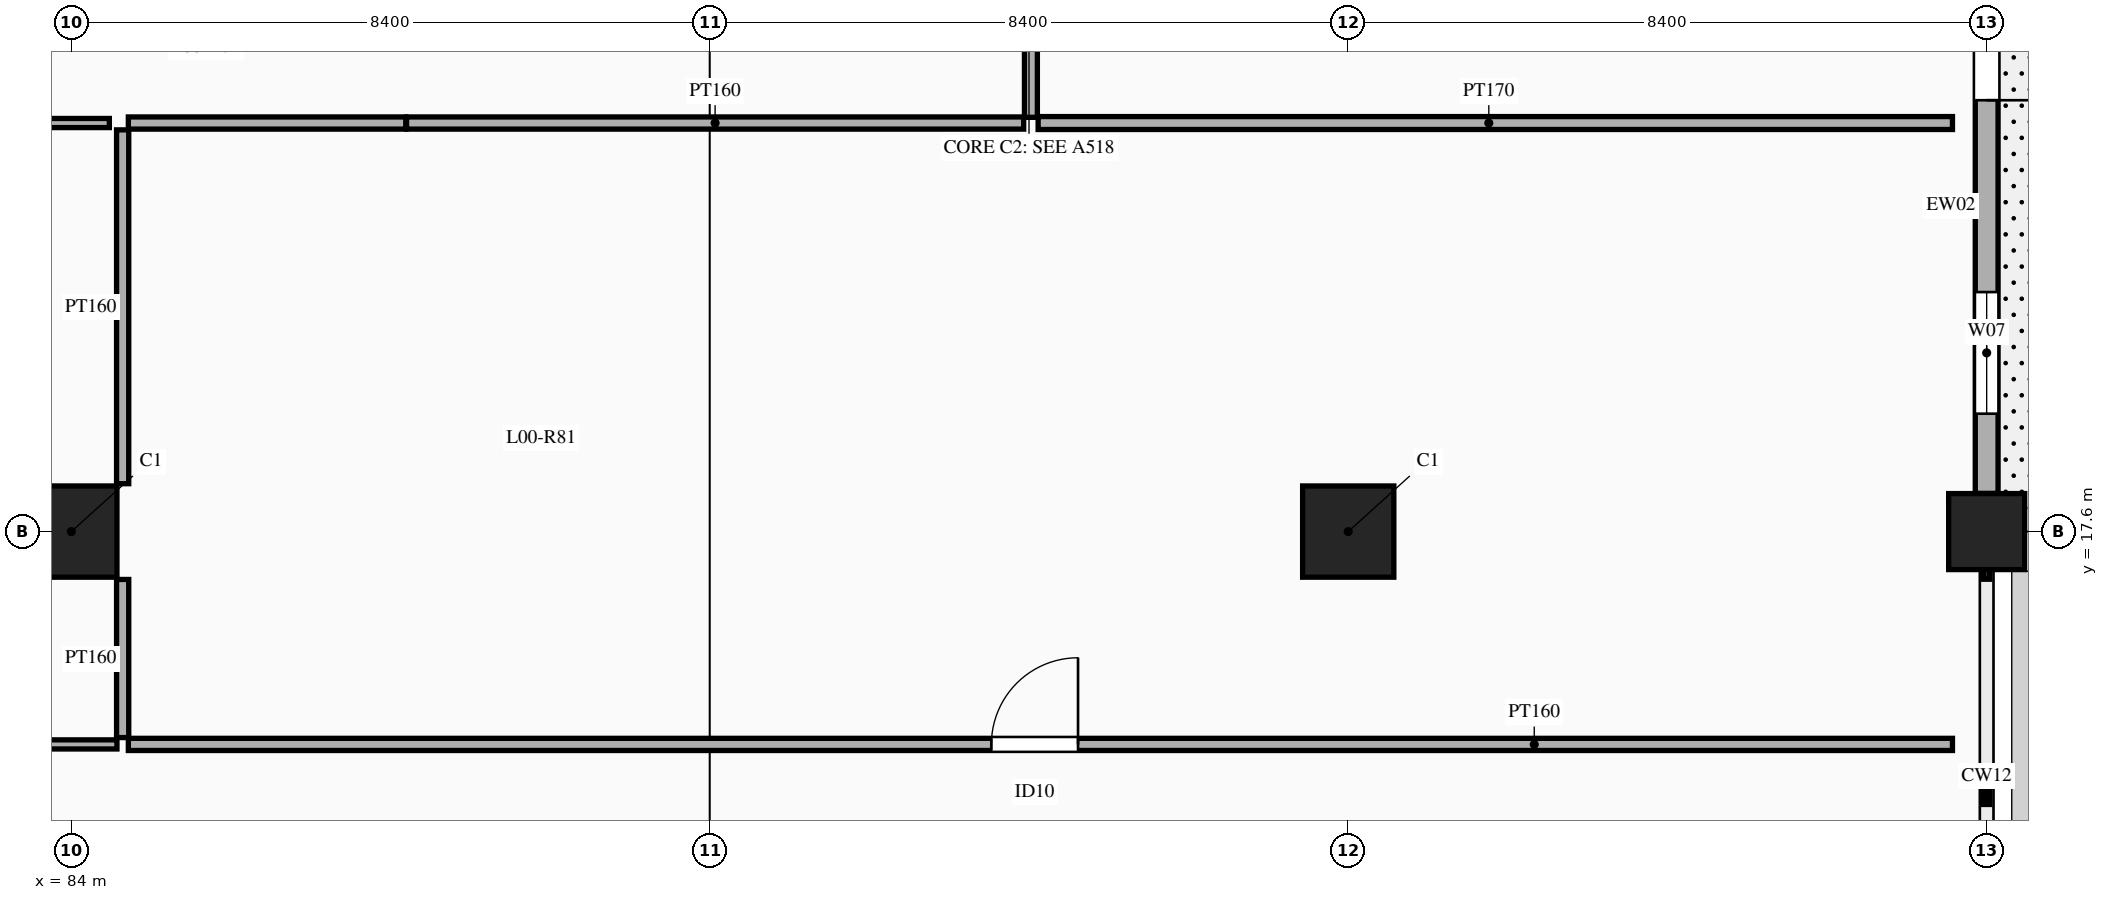
"""IFC4 building model, lengths in metres.
Left out: names, types, materials, properties, quantities, classifications, styles, units other than length and angle.
Written with IfcOpenShell. Run it as: python <this file> out.ifc"""

import sys

from ifc_helpers import new_model, si_unit, direction, frame, frame_2d, origin, origin_2d, place, context, subcontext, project, spatial, rectangle, extrude, element, fill, save


model = new_model("IFC4")
c1 = context("Model", 3, precision=1e-05, world=origin(), true_north=direction((0.0, 1.0)))
c2 = subcontext(c1, "Body", "Model", "MODEL_VIEW")
j1 = project(units=[si_unit("LENGTHUNIT", "METRE"), si_unit("PLANEANGLEUNIT", "RADIAN")], contexts=[c1])
p1 = place(None, origin())
s1 = spatial("IfcSite", under=j1, at=p1, CompositionType="ELEMENT")
p2 = place(p1, origin())
s2 = spatial("IfcBuilding", under=s1, at=p2, CompositionType="ELEMENT")
p3 = place(p2, origin())
s3 = spatial("IfcBuildingStorey", under=s2, at=p3, CompositionType="ELEMENT", Elevation=0.0)
for number, where, z_axis, x_axis in (
    (1, (84.0, 17.6, 0.0), (0.0, 0.0, 1.0), (1.0, 0.0, 0.0)),
    (2, (100.8, 17.6, 0.0), (0.0, 0.0, 1.0), (1.0, 0.0, 0.0)),
):
    element("IfcColumn", number, at=place(p3, frame(where, z_axis=z_axis, x_axis=x_axis)), inside=s3, PredefinedType="COLUMN", context=c2, shape_type="SweptSolid", body=[
        extrude(rectangle(XDim=1.2, YDim=1.2, at=origin_2d()), origin(), (0.0, 0.0, 1.0), 5.4),
    ])
p4 = place(p3, frame((109.2, 17.6, 0.0), z_axis=(0.0, 0.0, 1.0), x_axis=(1.0, 0.0, 0.0)))
e3 = element("IfcColumn", 3, at=p4, inside=s3, PredefinedType="COLUMN", context=c2, shape_type="SweptSolid", body=[
    extrude(rectangle(XDim=1.0, YDim=1.0, at=origin_2d()), origin(), (0.0, 0.0, 1.0), 5.4),
])
p5 = place(p3, frame((109.2, 18.102, 0.0), z_axis=(0.0, 0.0, 1.0), x_axis=(0.0, 1.0, 0.0)))
e4 = element("IfcWall", 4, at=p5, inside=s3, PredefinedType="SOLIDWALL", context=c2, shape_type="SweptSolid", body=[
    extrude(rectangle(XDim=7.396, YDim=0.3, at=frame_2d((3.698, 0.0))), origin(), (0.0, 0.0, 1.0), 4.45),
])
p6 = place(p5, frame((5.173, 0.0, 0.0)))
e5 = element("IfcOpeningElement", 5, at=p6, cuts=e4, PredefinedType="OPENING", context=c2, shape_type="SweptSolid", body=[
    extrude(rectangle(XDim=1.75, YDim=2.35, at=frame_2d((0.875, 1.175))), frame((0.0, 0.16, 0.0), z_axis=(0.0, -1.0, 0.0), x_axis=(1.0, 0.0, 0.0)), (0.0, 0.0, 1.0), 0.32),
])
p7 = place(p5, frame((1.049, 0.0, 0.9)))
e6 = element("IfcOpeningElement", 6, at=p7, cuts=e4, PredefinedType="OPENING", context=c2, shape_type="SweptSolid", body=[
    extrude(rectangle(XDim=1.6, YDim=2.1, at=frame_2d((0.8, 1.05))), frame((0.0, 0.16, 0.0), z_axis=(0.0, -1.0, 0.0), x_axis=(1.0, 0.0, 0.0)), (0.0, 0.0, 1.0), 0.32),
])
p8 = place(p3, frame((76.05, 22.975, 0.0), z_axis=(0.0, 0.0, 1.0), x_axis=(1.0, 0.0, 0.0)))
e7 = element("IfcWall", 7, at=p8, inside=s3, PredefinedType="PARTITIONING", context=c2, shape_type="SweptSolid", body=[
    extrude(rectangle(XDim=8.45, YDim=0.12, at=frame_2d((4.225, 0.0))), origin(), (0.0, 0.0, 1.0), 4.35),
])
p9 = place(p3, frame((84.75, 22.975, 0.0), z_axis=(0.0, 0.0, 1.0), x_axis=(1.0, 0.0, 0.0)))
e8 = element("IfcWall", 8, at=p9, inside=s3, PredefinedType="PARTITIONING", context=c2, shape_type="SweptSolid", body=[
    extrude(rectangle(XDim=3.65, YDim=0.16, at=frame_2d((1.825, 0.0))), origin(), (0.0, 0.0, 1.0), 4.35),
])
p10 = place(p3, frame((96.625, 23.05, 0.0), z_axis=(0.0, 0.0, 1.0), x_axis=(0.0, 1.0, 0.0)))
e9 = element("IfcWall", 9, at=p10, inside=s3, PredefinedType="PARTITIONING", context=c2, shape_type="SweptSolid", body=[
    extrude(rectangle(XDim=2.85, YDim=0.17, at=frame_2d((1.425, 0.0))), origin(), (0.0, 0.0, 1.0), 4.35),
])
p11 = place(p10, frame((0.885, 0.0, 0.0)))
e10 = element("IfcOpeningElement", 10, at=p11, cuts=e9, PredefinedType="OPENING", context=c2, shape_type="SweptSolid", body=[
    extrude(rectangle(XDim=1.08, YDim=2.15, at=frame_2d((0.54, 1.075))), frame((0.0, 0.095, 0.0), z_axis=(0.0, -1.0, 0.0), x_axis=(1.0, 0.0, 0.0)), (0.0, 0.0, 1.0), 0.19),
])
p12 = place(p3, frame((88.41, 22.975, 0.0), z_axis=(0.0, 0.0, 1.0), x_axis=(1.0, 0.0, 0.0)))
e11 = element("IfcWall", 11, at=p12, inside=s3, PredefinedType="PARTITIONING", context=c2, shape_type="SweptSolid", body=[
    extrude(rectangle(XDim=8.12, YDim=0.16, at=frame_2d((4.06, 0.0))), origin(), (0.0, 0.0, 1.0), 4.35),
])
p13 = place(p3, frame((96.72, 22.975, 0.0), z_axis=(0.0, 0.0, 1.0), x_axis=(1.0, 0.0, 0.0)))
e12 = element("IfcWall", 12, at=p13, inside=s3, PredefinedType="PARTITIONING", context=c2, shape_type="SweptSolid", body=[
    extrude(rectangle(XDim=12.03, YDim=0.17, at=frame_2d((6.015, 0.0))), origin(), (0.0, 0.0, 1.0), 4.35),
])
p14 = place(p3, frame((61.95, 14.8, 0.0), z_axis=(0.0, 0.0, 1.0), x_axis=(1.0, 0.0, 0.0)))
e13 = element("IfcWall", 13, at=p14, inside=s3, PredefinedType="PARTITIONING", context=c2, shape_type="SweptSolid", body=[
    extrude(rectangle(XDim=22.65, YDim=0.12, at=frame_2d((11.325, 0.0))), origin(), (0.0, 0.0, 1.0), 4.35),
])
p15 = place(p14, frame((9.378, 0.0, 0.0)))
e14 = element("IfcOpeningElement", 14, at=p15, cuts=e13, PredefinedType="OPENING", context=c2, shape_type="SweptSolid", body=[
    extrude(rectangle(XDim=1.5, YDim=2.3, at=frame_2d((0.75, 1.15))), frame((0.0, 0.07, 0.0), z_axis=(0.0, -1.0, 0.0), x_axis=(1.0, 0.0, 0.0)), (0.0, 0.0, 1.0), 0.14),
])
p16 = place(p3, frame((84.75, 14.8, 0.0), z_axis=(0.0, 0.0, 1.0), x_axis=(1.0, 0.0, 0.0)))
e15 = element("IfcWall", 15, at=p16, inside=s3, PredefinedType="PARTITIONING", context=c2, shape_type="SweptSolid", body=[
    extrude(rectangle(XDim=24.0, YDim=0.16, at=frame_2d((12.0, 0.0))), origin(), (0.0, 0.0, 1.0), 4.35),
])
p17 = place(p16, frame((11.355, 0.0, 0.0)))
e16 = element("IfcOpeningElement", 16, at=p17, cuts=e15, PredefinedType="OPENING", context=c2, shape_type="SweptSolid", body=[
    extrude(rectangle(XDim=1.14, YDim=2.22, at=frame_2d((0.57, 1.11))), frame((0.0, 0.09, 0.0), z_axis=(0.0, -1.0, 0.0), x_axis=(1.0, 0.0, 0.0)), (0.0, 0.0, 1.0), 0.18),
])
p18 = place(p3, frame((84.675, 14.89, 0.0), z_axis=(0.0, 0.0, 1.0), x_axis=(0.0, 1.0, 0.0)))
e17 = element("IfcWall", 17, at=p18, inside=s3, PredefinedType="PARTITIONING", context=c2, shape_type="SweptSolid", body=[
    extrude(rectangle(XDim=2.08, YDim=0.16, at=frame_2d((1.04, 0.0))), origin(), (0.0, 0.0, 1.0), 4.35),
])
p19 = place(p3, frame((84.675, 18.23, 0.0), z_axis=(0.0, 0.0, 1.0), x_axis=(0.0, 1.0, 0.0)))
e18 = element("IfcWall", 18, at=p19, inside=s3, PredefinedType="PARTITIONING", context=c2, shape_type="SweptSolid", body=[
    extrude(rectangle(XDim=4.655, YDim=0.16, at=frame_2d((2.328, 0.0))), origin(), (0.0, 0.0, 1.0), 4.35),
])
p20 = place(p6, frame((1.75, 0.0, 0.0), z_axis=(0.0, 0.0, 1.0), x_axis=(-1.0, 0.0, 0.0)))
e19 = element("IfcDoor", 19, at=p20, inside=s3, OperationType="DOUBLE_DOOR_SINGLE_SWING", PredefinedType="DOOR", context=c2, shape_type="SweptSolid", body=[
    extrude(rectangle(XDim=1.75, YDim=2.35, at=frame_2d((0.875, 1.175))), frame((0.0, 0.025, 0.0), z_axis=(0.0, -1.0, 0.0), x_axis=(1.0, 0.0, 0.0)), (0.0, 0.0, 1.0), 0.05),
])
fill(e5, e19)
p21 = place(p7, origin())
e20 = element("IfcWindow", 20, at=p21, inside=s3, PartitioningType="DOUBLE_PANEL_VERTICAL", PredefinedType="WINDOW", context=c2, shape_type="SweptSolid", body=[
    extrude(rectangle(XDim=1.6, YDim=2.1, at=frame_2d((0.8, 1.05))), frame((0.0, 0.03, 0.0), z_axis=(0.0, -1.0, 0.0), x_axis=(1.0, 0.0, 0.0)), (0.0, 0.0, 1.0), 0.06),
])
fill(e6, e20)
p22 = place(p17, origin())
e21 = element("IfcDoor", 21, at=p22, inside=s3, OperationType="SINGLE_SWING_RIGHT", PredefinedType="DOOR", context=c2, shape_type="SweptSolid", body=[
    extrude(rectangle(XDim=1.14, YDim=2.22, at=frame_2d((0.57, 1.11))), frame((0.0, 0.025, 0.0), z_axis=(0.0, -1.0, 0.0), x_axis=(1.0, 0.0, 0.0)), (0.0, 0.0, 1.0), 0.05),
])
fill(e16, e21)
save(model, sys.argv[1])
